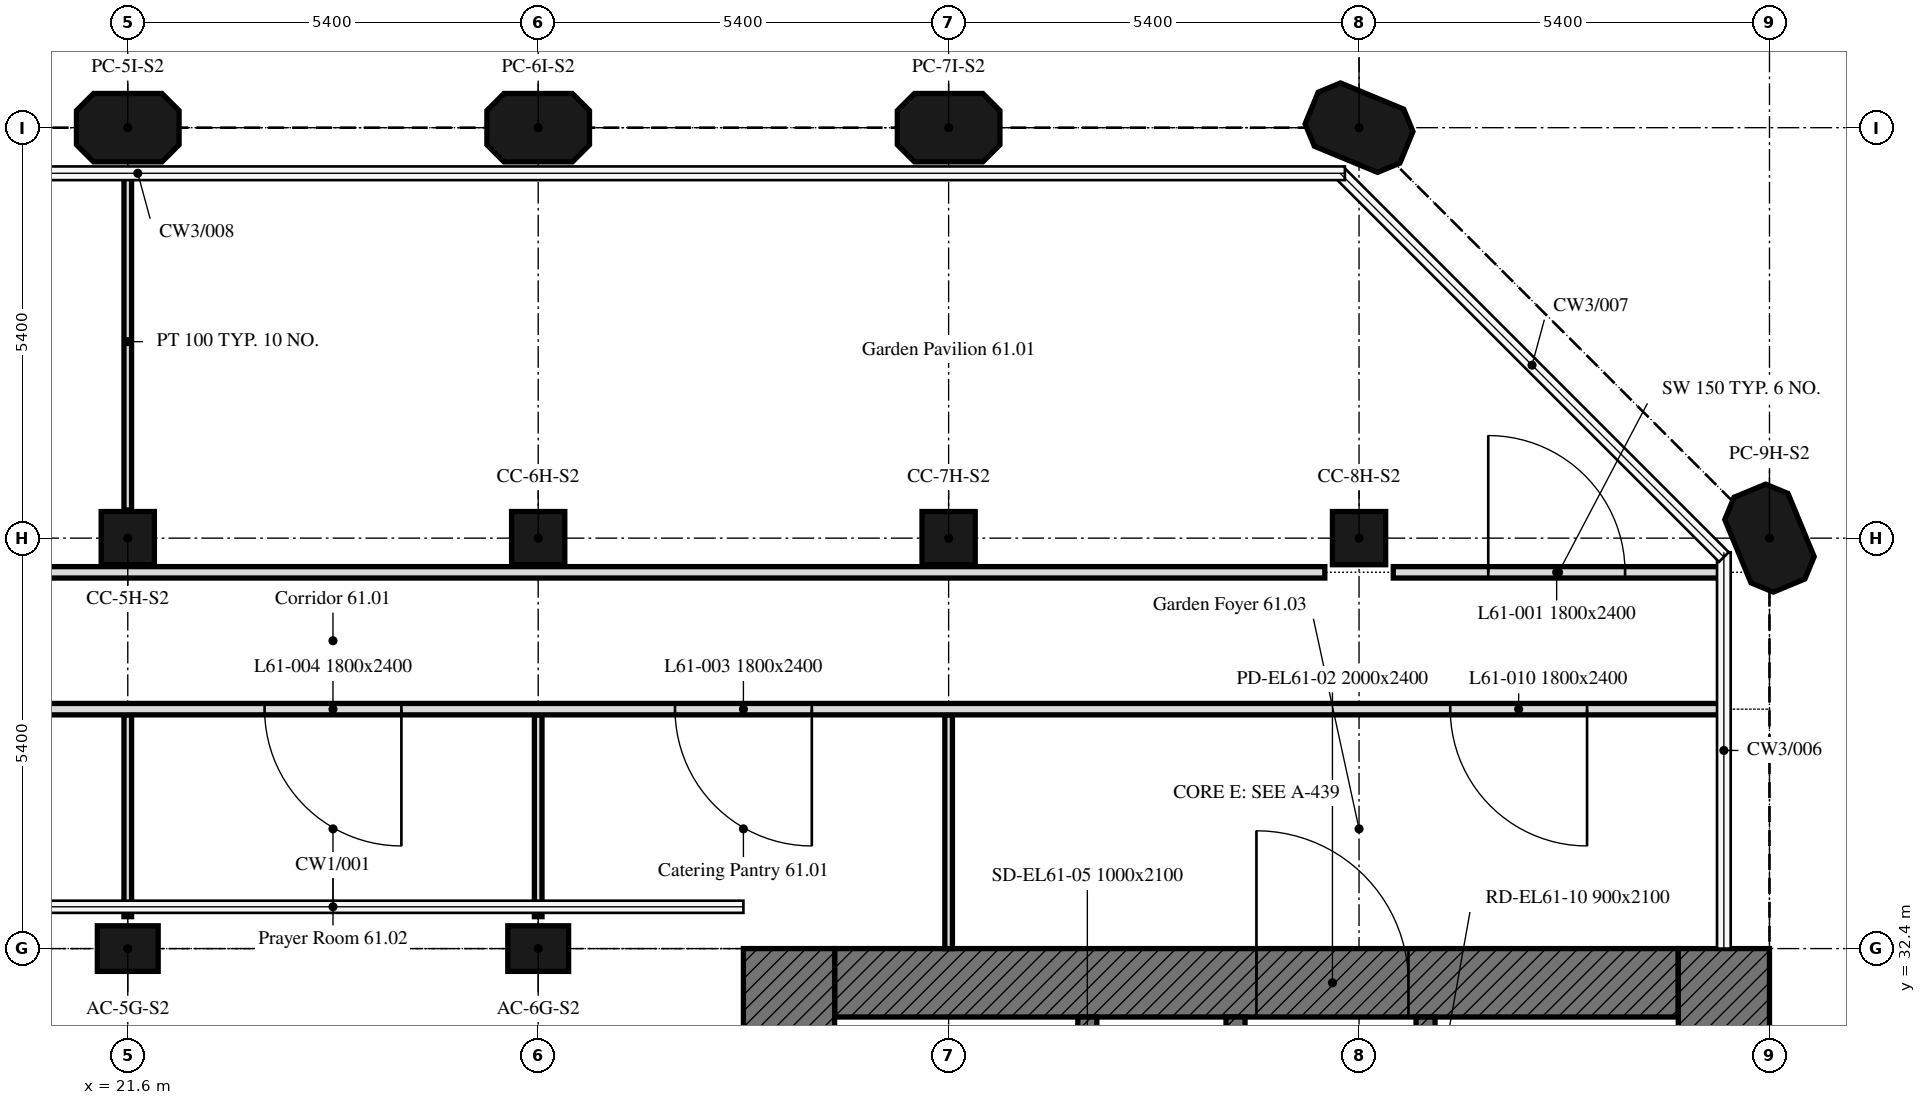
"""IFC4 building model, lengths in metres.
Left out: names, types, materials, properties, quantities, classifications, styles, units other than length and angle.
Written with IfcOpenShell. Run it as: python <this file> out.ifc"""

import sys

from ifc_helpers import new_model, si_unit, direction, frame, frame_2d, origin, origin_2d, place, context, subcontext, project, spatial, polyline, rectangle, outline, extrude, element, fill, save


model = new_model("IFC4")
c1 = context("Model", 3, precision=1e-05, world=origin(), true_north=direction((0.0, 1.0)))
c2 = subcontext(c1, "Body", "Model", "MODEL_VIEW")
j1 = project(units=[si_unit("LENGTHUNIT", "METRE"), si_unit("PLANEANGLEUNIT", "RADIAN")], contexts=[c1])
p1 = place(None, origin())
s1 = spatial("IfcSite", under=j1, at=p1, CompositionType="ELEMENT")
p2 = place(p1, origin())
s2 = spatial("IfcBuilding", under=s1, at=p2, CompositionType="ELEMENT")
p3 = place(p2, frame((0.0, 0.0, 250.9)))
s3 = spatial("IfcBuildingStorey", under=s2, at=p3, CompositionType="ELEMENT", Elevation=250.9)
for number, where, z_axis, x_axis in (
    (1, (21.6, 32.4, 0.0), (0.0, 0.0, 1.0), (1.0, 0.0, 0.0)),
    (2, (27.0, 32.4, 0.0), (0.0, 0.0, 1.0), (1.0, 0.0, 0.0)),
):
    element("IfcColumn", number, at=place(p3, frame(where, z_axis=z_axis, x_axis=x_axis)), inside=s3, PredefinedType="COLUMN", context=c2, shape_type="SweptSolid", body=[
        extrude(rectangle(XDim=0.8, YDim=0.6, at=origin_2d()), origin(), (0.0, 0.0, 1.0), 4.5),
    ])
for number, where, z_axis, x_axis in (
    (3, (21.6, 37.8, 0.0), (0.0, 0.0, 1.0), (1.0, 0.0, 0.0)),
    (4, (27.0, 37.8, 0.0), (0.0, 0.0, 1.0), (1.0, 0.0, 0.0)),
    (5, (32.4, 37.8, 0.0), (0.0, 0.0, 1.0), (1.0, 0.0, 0.0)),
    (6, (37.8, 37.8, 0.0), (0.0, 0.0, 1.0), (1.0, 0.0, 0.0)),
):
    element("IfcColumn", number, at=place(p3, frame(where, z_axis=z_axis, x_axis=x_axis)), inside=s3, PredefinedType="COLUMN", context=c2, shape_type="SweptSolid", body=[
        extrude(rectangle(XDim=0.7, YDim=0.7, at=origin_2d()), origin(), (0.0, 0.0, 1.0), 4.5),
    ])
for number, where, z_axis, x_axis in (
    (7, (43.2, 37.8, 0.0), (0.0, 0.0, 1.0), (-0.383, 0.924, 0.0)),
    (8, (21.6, 43.2, 0.0), (0.0, 0.0, 1.0), (1.0, 0.0, 0.0)),
    (9, (27.0, 43.2, 0.0), (0.0, 0.0, 1.0), (1.0, 0.0, 0.0)),
    (10, (32.4, 43.2, 0.0), (0.0, 0.0, 1.0), (1.0, 0.0, 0.0)),
    (11, (37.8, 43.2, 0.0), (0.0, 0.0, 1.0), (-0.924, 0.383, 0.0)),
):
    element("IfcColumn", number, at=place(p3, frame(where, z_axis=z_axis, x_axis=x_axis)), inside=s3, PredefinedType="COLUMN", context=c2, shape_type="SweptSolid", body=[
        extrude(outline(polyline([(-0.45, -0.45), (0.45, -0.45), (0.675, -0.225), (0.675, 0.225), (0.45, 0.45), (-0.45, 0.45), (-0.675, 0.225), (-0.675, -0.225), (-0.45, -0.45)])), origin(), (0.0, 0.0, 1.0), 4.5),
    ])
p4 = place(p3, frame((30.9, 31.95, 0.0), z_axis=(0.0, 0.0, 1.0), x_axis=(1.0, 0.0, 0.0)))
e12 = element("IfcWall", 12, at=p4, inside=s3, PredefinedType="SOLIDWALL", context=c2, shape_type="SweptSolid", body=[
    extrude(rectangle(XDim=11.1, YDim=0.9, at=frame_2d((5.55, 0.0))), origin(), (0.0, 0.0, 1.0), 4.5),
])
p5 = place(p4, frame((5.55, 0.0, 0.0)))
e13 = element("IfcOpeningElement", 13, at=p5, cuts=e12, PredefinedType="OPENING", context=c2, shape_type="SweptSolid", body=[
    extrude(rectangle(XDim=2.0, YDim=2.4, at=frame_2d((1.0, 1.2))), frame((0.0, 0.45, 0.0), z_axis=(0.0, -1.0, 0.0), x_axis=(1.0, 0.0, 0.0)), (0.0, 0.0, 1.0), 0.9),
])
for number, where, z_axis, x_axis in (
    (14, (42.6, 32.4, 0.0), (0.0, 0.0, 1.0), (0.0, -1.0, 0.0)),
    (15, (30.3, 16.2, 0.0), (0.0, 0.0, 1.0), (0.0, 1.0, 0.0)),
):
    element("IfcWall", number, at=place(p3, frame(where, z_axis=z_axis, x_axis=x_axis)), inside=s3, PredefinedType="SOLIDWALL", context=c2, shape_type="SweptSolid", body=[
        extrude(rectangle(XDim=16.2, YDim=1.2, at=frame_2d((8.1, 0.0))), origin(), (0.0, 0.0, 1.0), 4.5),
    ])
p6 = place(p3, frame((38.675, 17.1, 0.0), z_axis=(0.0, 0.0, 1.0), x_axis=(0.0, 1.0, 0.0)))
e16 = element("IfcWall", 16, at=p6, inside=s3, PredefinedType="SOLIDWALL", context=c2, shape_type="SweptSolid", body=[
    extrude(rectangle(XDim=14.4, YDim=0.25, at=frame_2d((7.2, 0.0))), origin(), (0.0, 0.0, 1.0), 4.5),
])
p7 = place(p6, frame((4.6, 0.0, 0.0)))
e17 = element("IfcOpeningElement", 17, at=p7, cuts=e16, PredefinedType="OPENING", context=c2, shape_type="SweptSolid", body=[
    extrude(rectangle(XDim=1.0, YDim=2.1, at=frame_2d((0.5, 1.05))), frame((0.0, 0.125, 0.0), z_axis=(0.0, -1.0, 0.0), x_axis=(1.0, 0.0, 0.0)), (0.0, 0.0, 1.0), 0.25),
])
p8 = place(p6, frame((7.062, 0.0, 0.0)))
e18 = element("IfcOpeningElement", 18, at=p8, cuts=e16, PredefinedType="OPENING", context=c2, shape_type="SweptSolid", body=[
    extrude(rectangle(XDim=1.2, YDim=2.1, at=frame_2d((0.6, 1.05))), frame((0.0, 0.125, 0.0), z_axis=(0.0, -1.0, 0.0), x_axis=(1.0, 0.0, 0.0)), (0.0, 0.0, 1.0), 0.25),
])
p9 = place(p6, frame((10.106, 0.0, 0.0)))
e19 = element("IfcOpeningElement", 19, at=p9, cuts=e16, PredefinedType="OPENING", context=c2, shape_type="SweptSolid", body=[
    extrude(rectangle(XDim=0.9, YDim=2.1, at=frame_2d((0.45, 1.05))), frame((0.0, 0.125, 0.0), z_axis=(0.0, -1.0, 0.0), x_axis=(1.0, 0.0, 0.0)), (0.0, 0.0, 1.0), 0.25),
])
p10 = place(p6, frame((12.048, 0.0, 0.0)))
e20 = element("IfcOpeningElement", 20, at=p10, cuts=e16, PredefinedType="OPENING", context=c2, shape_type="SweptSolid", body=[
    extrude(rectangle(XDim=0.9, YDim=2.1, at=frame_2d((0.45, 1.05))), frame((0.0, 0.125, 0.0), z_axis=(0.0, -1.0, 0.0), x_axis=(1.0, 0.0, 0.0)), (0.0, 0.0, 1.0), 0.25),
])
p11 = place(p6, frame((13.354, 0.0, 0.0)))
e21 = element("IfcOpeningElement", 21, at=p11, cuts=e16, PredefinedType="OPENING", context=c2, shape_type="SweptSolid", body=[
    extrude(rectangle(XDim=0.9, YDim=2.1, at=frame_2d((0.45, 1.05))), frame((0.0, 0.125, 0.0), z_axis=(0.0, -1.0, 0.0), x_axis=(1.0, 0.0, 0.0)), (0.0, 0.0, 1.0), 0.25),
])
p12 = place(p3, frame((34.225, 17.1, 0.0), z_axis=(0.0, 0.0, 1.0), x_axis=(0.0, 1.0, 0.0)))
e22 = element("IfcWall", 22, at=p12, inside=s3, PredefinedType="SOLIDWALL", context=c2, shape_type="SweptSolid", body=[
    extrude(rectangle(XDim=14.4, YDim=0.25, at=frame_2d((7.2, 0.0))), origin(), (0.0, 0.0, 1.0), 4.5),
])
p13 = place(p12, frame((13.15, 0.0, 0.0)))
e23 = element("IfcOpeningElement", 23, at=p13, cuts=e22, PredefinedType="OPENING", context=c2, shape_type="SweptSolid", body=[
    extrude(rectangle(XDim=1.0, YDim=2.1, at=frame_2d((0.5, 1.05))), frame((0.0, 0.125, 0.0), z_axis=(0.0, -1.0, 0.0), x_axis=(1.0, 0.0, 0.0)), (0.0, 0.0, 1.0), 0.25),
])
p14 = place(p12, frame((3.15, 0.0, 0.0)))
e24 = element("IfcOpeningElement", 24, at=p14, cuts=e22, PredefinedType="OPENING", context=c2, shape_type="SweptSolid", body=[
    extrude(rectangle(XDim=1.1, YDim=2.1, at=frame_2d((0.55, 1.05))), frame((0.0, 0.125, 0.0), z_axis=(0.0, -1.0, 0.0), x_axis=(1.0, 0.0, 0.0)), (0.0, 0.0, 1.0), 0.25),
])
p15 = place(p12, frame((0.7, 0.0, 0.0)))
e25 = element("IfcOpeningElement", 25, at=p15, cuts=e22, PredefinedType="OPENING", context=c2, shape_type="SweptSolid", body=[
    extrude(rectangle(XDim=0.9, YDim=2.1, at=frame_2d((0.45, 1.05))), frame((0.0, 0.125, 0.0), z_axis=(0.0, -1.0, 0.0), x_axis=(1.0, 0.0, 0.0)), (0.0, 0.0, 1.0), 0.25),
])
p16 = place(p12, frame((6.175, 0.0, 0.0)))
e26 = element("IfcOpeningElement", 26, at=p16, cuts=e22, PredefinedType="OPENING", context=c2, shape_type="SweptSolid", body=[
    extrude(rectangle(XDim=0.9, YDim=2.1, at=frame_2d((0.45, 1.05))), frame((0.0, 0.125, 0.0), z_axis=(0.0, -1.0, 0.0), x_axis=(1.0, 0.0, 0.0)), (0.0, 0.0, 1.0), 0.25),
])
p17 = place(p3, frame((36.175, 29.4, 0.0), z_axis=(0.0, 0.0, 1.0), x_axis=(0.0, 1.0, 0.0)))
e27 = element("IfcWall", 27, at=p17, inside=s3, PredefinedType="SOLIDWALL", context=c2, shape_type="SweptSolid", body=[
    extrude(rectangle(XDim=2.1, YDim=0.25, at=frame_2d((1.05, 0.0))), origin(), (0.0, 0.0, 1.0), 4.5),
])
p18 = place(p17, frame((0.5, 0.0, 0.0)))
e28 = element("IfcOpeningElement", 28, at=p18, cuts=e27, PredefinedType="OPENING", context=c2, shape_type="SweptSolid", body=[
    extrude(rectangle(XDim=1.0, YDim=2.1, at=frame_2d((0.5, 1.05))), frame((0.0, 0.125, 0.0), z_axis=(0.0, -1.0, 0.0), x_axis=(1.0, 0.0, 0.0)), (0.0, 0.0, 1.0), 0.25),
])
p19 = place(p3, frame((21.6, 42.6, 0.0), z_axis=(0.0, 0.0, 1.0), x_axis=(0.0, -1.0, 0.0)))
e29 = element("IfcWall", 29, at=p19, inside=s3, PredefinedType="PARTITIONING", context=c2, shape_type="SweptSolid", body=[
    extrude(rectangle(XDim=4.43, YDim=0.1, at=frame_2d((2.215, 0.0))), origin(), (0.0, 0.0, 1.0), 3.75),
])
p20 = place(p3, frame((38.251, 37.35, 0.0), z_axis=(0.0, 0.0, 1.0), x_axis=(1.0, 0.0, 0.0)))
e30 = element("IfcWall", 30, at=p20, inside=s3, PredefinedType="PARTITIONING", context=c2, shape_type="SweptSolid", body=[
    extrude(rectangle(XDim=4.349, YDim=0.15, at=frame_2d((2.175, 0.0))), origin(), (0.0, 0.0, 1.0), 4.5),
])
p21 = place(p20, frame((1.249, 0.0, 0.0)))
e31 = element("IfcOpeningElement", 31, at=p21, cuts=e30, PredefinedType="OPENING", context=c2, shape_type="SweptSolid", body=[
    extrude(rectangle(XDim=1.8, YDim=2.4, at=frame_2d((0.9, 1.2))), frame((0.0, 0.075, 0.0), z_axis=(0.0, -1.0, 0.0), x_axis=(1.0, 0.0, 0.0)), (0.0, 0.0, 1.0), 0.15),
])
p22 = place(p3, frame((6.151, 37.35, 0.0), z_axis=(0.0, 0.0, 1.0), x_axis=(1.0, 0.0, 0.0)))
e32 = element("IfcWall", 32, at=p22, inside=s3, PredefinedType="PARTITIONING", context=c2, shape_type="SweptSolid", body=[
    extrude(rectangle(XDim=31.198, YDim=0.15, at=frame_2d((15.599, 0.0))), origin(), (0.0, 0.0, 1.0), 3.75),
])
p23 = place(p22, frame((6.449, 0.0, 0.0)))
e33 = element("IfcOpeningElement", 33, at=p23, cuts=e32, PredefinedType="OPENING", context=c2, shape_type="SweptSolid", body=[
    extrude(rectangle(XDim=1.8, YDim=2.4, at=frame_2d((0.9, 1.2))), frame((0.0, 0.075, 0.0), z_axis=(0.0, -1.0, 0.0), x_axis=(1.0, 0.0, 0.0)), (0.0, 0.0, 1.0), 0.15),
])
p24 = place(p3, frame((32.4, 32.4, 0.0), z_axis=(0.0, 0.0, 1.0), x_axis=(0.0, 1.0, 0.0)))
e34 = element("IfcWall", 34, at=p24, inside=s3, PredefinedType="PARTITIONING", context=c2, shape_type="SweptSolid", body=[
    extrude(rectangle(XDim=3.075, YDim=0.1, at=frame_2d((1.538, 0.0))), origin(), (0.0, 0.0, 1.0), 4.5),
])
for number, where, z_axis, x_axis in (
    (35, (27.0, 35.475, 0.0), (0.0, 0.0, 1.0), (0.0, -1.0, 0.0)),
    (36, (21.6, 35.475, 0.0), (0.0, 0.0, 1.0), (0.0, -1.0, 0.0)),
):
    element("IfcWall", number, at=place(p3, frame(where, z_axis=z_axis, x_axis=x_axis)), inside=s3, PredefinedType="PARTITIONING", context=c2, shape_type="SweptSolid", body=[
        extrude(rectangle(XDim=2.655, YDim=0.1, at=frame_2d((1.328, 0.0))), origin(), (0.0, 0.0, 1.0), 3.75),
    ])
p25 = place(p3, frame((42.6, 35.55, 0.0), z_axis=(0.0, 0.0, 1.0), x_axis=(-1.0, 0.0, 0.0)))
e37 = element("IfcWall", 37, at=p25, inside=s3, PredefinedType="PARTITIONING", context=c2, shape_type="SweptSolid", body=[
    extrude(rectangle(XDim=36.449, YDim=0.15, at=frame_2d((18.225, 0.0))), origin(), (0.0, 0.0, 1.0), 3.75),
])
p26 = place(p25, frame((12.0, 0.0, 0.0)))
e38 = element("IfcOpeningElement", 38, at=p26, cuts=e37, PredefinedType="OPENING", context=c2, shape_type="SweptSolid", body=[
    extrude(rectangle(XDim=1.8, YDim=2.4, at=frame_2d((0.9, 1.2))), frame((0.0, 0.075, 0.0), z_axis=(0.0, -1.0, 0.0), x_axis=(1.0, 0.0, 0.0)), (0.0, 0.0, 1.0), 0.15),
])
p27 = place(p25, frame((17.4, 0.0, 0.0)))
e39 = element("IfcOpeningElement", 39, at=p27, cuts=e37, PredefinedType="OPENING", context=c2, shape_type="SweptSolid", body=[
    extrude(rectangle(XDim=1.8, YDim=2.4, at=frame_2d((0.9, 1.2))), frame((0.0, 0.075, 0.0), z_axis=(0.0, -1.0, 0.0), x_axis=(1.0, 0.0, 0.0)), (0.0, 0.0, 1.0), 0.15),
])
p28 = place(p25, frame((22.8, 0.0, 0.0)))
e40 = element("IfcOpeningElement", 40, at=p28, cuts=e37, PredefinedType="OPENING", context=c2, shape_type="SweptSolid", body=[
    extrude(rectangle(XDim=1.8, YDim=2.4, at=frame_2d((0.9, 1.2))), frame((0.0, 0.075, 0.0), z_axis=(0.0, -1.0, 0.0), x_axis=(1.0, 0.0, 0.0)), (0.0, 0.0, 1.0), 0.15),
])
p29 = place(p25, frame((1.8, 0.0, 0.0)))
e41 = element("IfcOpeningElement", 41, at=p29, cuts=e37, PredefinedType="OPENING", context=c2, shape_type="SweptSolid", body=[
    extrude(rectangle(XDim=1.8, YDim=2.4, at=frame_2d((0.9, 1.2))), frame((0.0, 0.075, 0.0), z_axis=(0.0, -1.0, 0.0), x_axis=(1.0, 0.0, 0.0)), (0.0, 0.0, 1.0), 0.15),
])
p30 = place(p25, frame((28.8, 0.0, 0.0)))
e42 = element("IfcOpeningElement", 42, at=p30, cuts=e37, PredefinedType="OPENING", context=c2, shape_type="SweptSolid", body=[
    extrude(rectangle(XDim=1.8, YDim=2.4, at=frame_2d((0.9, 1.2))), frame((0.0, 0.075, 0.0), z_axis=(0.0, -1.0, 0.0), x_axis=(1.0, 0.0, 0.0)), (0.0, 0.0, 1.0), 0.15),
])
p31 = place(p5, origin())
e43 = element("IfcDoor", 43, at=p31, inside=s3, OperationType="DOUBLE_DOOR_SINGLE_SWING", PredefinedType="DOOR", context=c2, shape_type="SweptSolid", body=[
    extrude(rectangle(XDim=2.0, YDim=2.4, at=frame_2d((1.0, 1.2))), frame((0.0, 0.025, 0.0), z_axis=(0.0, -1.0, 0.0), x_axis=(1.0, 0.0, 0.0)), (0.0, 0.0, 1.0), 0.05),
])
fill(e13, e43)
p32 = place(p21, origin())
e44 = element("IfcDoor", 44, at=p32, inside=s3, OperationType="DOUBLE_DOOR_SINGLE_SWING", PredefinedType="DOOR", context=c2, shape_type="SweptSolid", body=[
    extrude(rectangle(XDim=1.8, YDim=2.4, at=frame_2d((0.9, 1.2))), frame((0.0, 0.025, 0.0), z_axis=(0.0, -1.0, 0.0), x_axis=(1.0, 0.0, 0.0)), (0.0, 0.0, 1.0), 0.05),
])
fill(e31, e44)
p33 = place(p26, origin())
e45 = element("IfcDoor", 45, at=p33, inside=s3, OperationType="DOUBLE_DOOR_SINGLE_SWING", PredefinedType="DOOR", context=c2, shape_type="SweptSolid", body=[
    extrude(rectangle(XDim=1.8, YDim=2.4, at=frame_2d((0.9, 1.2))), frame((0.0, 0.025, 0.0), z_axis=(0.0, -1.0, 0.0), x_axis=(1.0, 0.0, 0.0)), (0.0, 0.0, 1.0), 0.05),
])
fill(e38, e45)
p34 = place(p27, origin())
e46 = element("IfcDoor", 46, at=p34, inside=s3, OperationType="DOUBLE_DOOR_SINGLE_SWING", PredefinedType="DOOR", context=c2, shape_type="SweptSolid", body=[
    extrude(rectangle(XDim=1.8, YDim=2.4, at=frame_2d((0.9, 1.2))), frame((0.0, 0.025, 0.0), z_axis=(0.0, -1.0, 0.0), x_axis=(1.0, 0.0, 0.0)), (0.0, 0.0, 1.0), 0.05),
])
fill(e39, e46)
p35 = place(p29, origin())
e47 = element("IfcDoor", 47, at=p35, inside=s3, OperationType="DOUBLE_DOOR_SINGLE_SWING", PredefinedType="DOOR", context=c2, shape_type="SweptSolid", body=[
    extrude(rectangle(XDim=1.8, YDim=2.4, at=frame_2d((0.9, 1.2))), frame((0.0, 0.025, 0.0), z_axis=(0.0, -1.0, 0.0), x_axis=(1.0, 0.0, 0.0)), (0.0, 0.0, 1.0), 0.05),
])
fill(e41, e47)
save(model, sys.argv[1])
